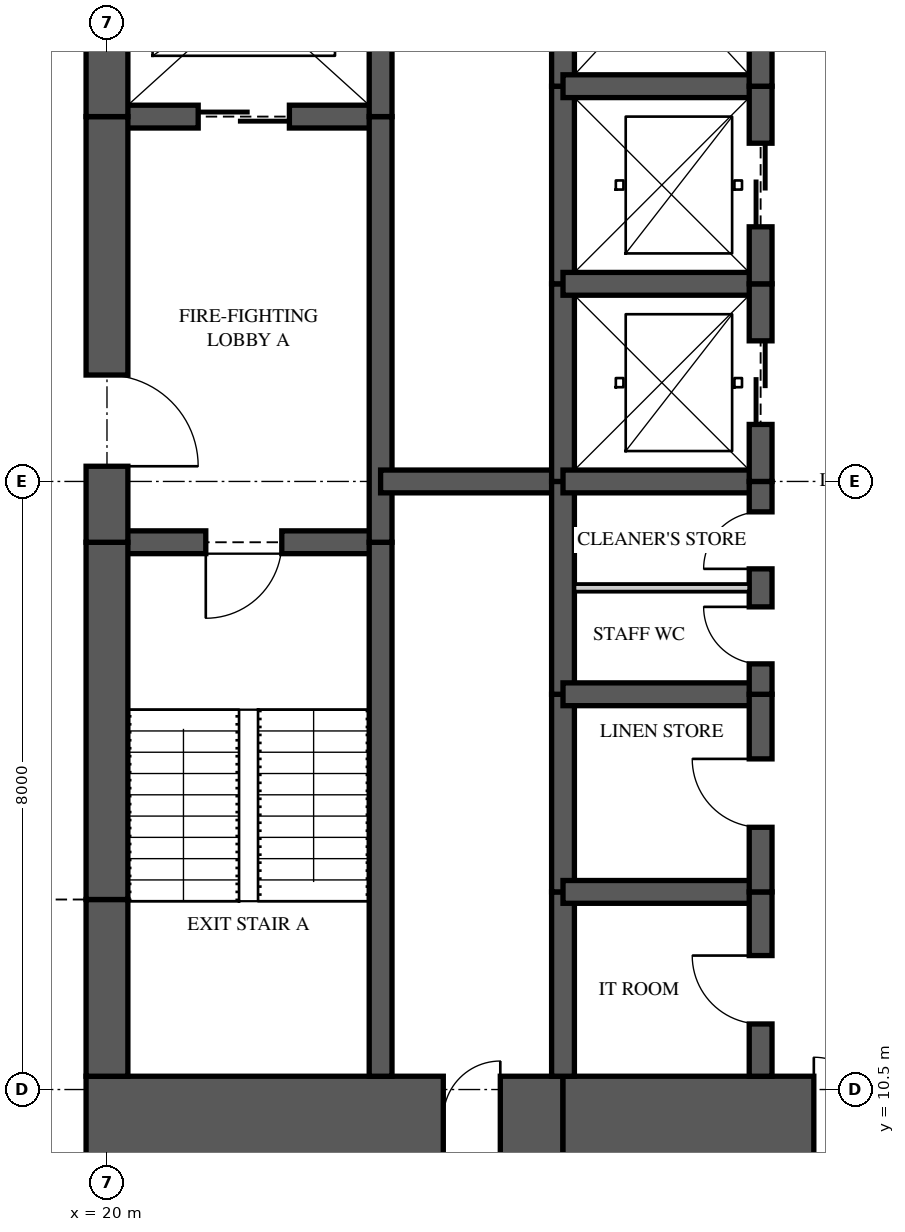
"""IFC4 building model, lengths in metres.
Left out: names, types, materials, properties, quantities, classifications, styles, units other than length and angle.
Written with IfcOpenShell. Run it as: python <this file> out.ifc"""

import sys

from ifc_helpers import new_model, si_unit, direction, frame, frame_2d, origin, place, context, subcontext, project, spatial, rectangle, extrude, element, fill, save


model = new_model("IFC4")
c1 = context("Model", 3, precision=1e-05, world=origin(), true_north=direction((0.0, 1.0)))
c2 = subcontext(c1, "Body", "Model", "MODEL_VIEW")
j1 = project(units=[si_unit("LENGTHUNIT", "METRE"), si_unit("PLANEANGLEUNIT", "RADIAN")], contexts=[c1])
p1 = place(None, origin())
s1 = spatial("IfcSite", under=j1, at=p1, CompositionType="ELEMENT")
p2 = place(p1, origin())
s2 = spatial("IfcBuilding", under=s1, at=p2, CompositionType="ELEMENT")
p3 = place(p2, frame((0.0, 0.0, 228.45)))
s3 = spatial("IfcBuildingStorey", under=s2, at=p3, CompositionType="ELEMENT", Elevation=228.45)
p4 = place(p3, frame((19.725, 10.125, 0.0), z_axis=(0.0, 0.0, 1.0), x_axis=(1.0, 0.0, 0.0)))
e1 = element("IfcWall", 1, at=p4, inside=s3, PredefinedType="SHEAR", context=c2, shape_type="SweptSolid", body=[
    extrude(rectangle(XDim=6.275, YDim=1.1, at=frame_2d((3.137, 0.0))), origin(), (0.0, 0.0, 1.0), 3.5),
])
p5 = place(p4, frame((4.7, 0.0, 0.0)))
e2 = element("IfcOpeningElement", 2, at=p5, cuts=e1, PredefinedType="OPENING", context=c2, shape_type="SweptSolid", body=[
    extrude(rectangle(XDim=0.75, YDim=2.1, at=frame_2d((0.375, 1.05))), frame((0.0, 0.56, 0.0), z_axis=(0.0, -1.0, 0.0), x_axis=(1.0, 0.0, 0.0)), (0.0, 0.0, 1.0), 1.12),
])
p6 = place(p3, frame((26.0, 10.125, 0.0), z_axis=(0.0, 0.0, 1.0), x_axis=(1.0, 0.0, 0.0)))
e3 = element("IfcWall", 3, at=p6, inside=s3, PredefinedType="SHEAR", context=c2, shape_type="SweptSolid", body=[
    extrude(rectangle(XDim=5.6, YDim=1.1, at=frame_2d((2.8, 0.0))), origin(), (0.0, 0.0, 1.0), 3.5),
])
p7 = place(p6, frame((3.3, 0.0, 0.0)))
e4 = element("IfcOpeningElement", 4, at=p7, cuts=e3, PredefinedType="OPENING", context=c2, shape_type="SweptSolid", body=[
    extrude(rectangle(XDim=1.6, YDim=2.1, at=frame_2d((0.8, 1.05))), frame((0.0, 0.56, 0.0), z_axis=(0.0, -1.0, 0.0), x_axis=(1.0, 0.0, 0.0)), (0.0, 0.0, 1.0), 1.12),
])
p8 = place(p3, frame((20.0, 26.325, 0.0), z_axis=(0.0, 0.0, 1.0), x_axis=(0.0, -1.0, 0.0)))
e5 = element("IfcWall", 5, at=p8, inside=s3, PredefinedType="SHEAR", context=c2, shape_type="SweptSolid", body=[
    extrude(rectangle(XDim=3.025, YDim=0.55, at=frame_2d((1.512, 0.0))), origin(), (0.0, 0.0, 1.0), 3.5),
])
p9 = place(p3, frame((20.0, 23.3, 0.0), z_axis=(0.0, 0.0, 1.0), x_axis=(0.0, -1.0, 0.0)))
e6 = element("IfcWall", 6, at=p9, inside=s3, PredefinedType="SHEAR", context=c2, shape_type="SweptSolid", body=[
    extrude(rectangle(XDim=5.6, YDim=0.55, at=frame_2d((2.8, 0.0))), origin(), (0.0, 0.0, 1.0), 3.5),
])
p10 = place(p9, frame((3.4, 0.0, 0.0)))
e7 = element("IfcOpeningElement", 7, at=p10, cuts=e6, PredefinedType="OPENING", context=c2, shape_type="SweptSolid", body=[
    extrude(rectangle(XDim=1.2, YDim=2.2, at=frame_2d((0.6, 1.1))), frame((0.0, 0.285, 0.0), z_axis=(0.0, -1.0, 0.0), x_axis=(1.0, 0.0, 0.0)), (0.0, 0.0, 1.0), 0.57),
])
p11 = place(p3, frame((20.0, 17.7, 0.0), z_axis=(0.0, 0.0, 1.0), x_axis=(0.0, -1.0, 0.0)))
e8 = element("IfcWall", 8, at=p11, inside=s3, PredefinedType="SHEAR", context=c2, shape_type="SweptSolid", body=[
    extrude(rectangle(XDim=4.7, YDim=0.55, at=frame_2d((2.35, 0.0))), origin(), (0.0, 0.0, 1.0), 3.5),
])
p12 = place(p3, frame((20.0, 13.0, 0.0), z_axis=(0.0, 0.0, 1.0), x_axis=(0.0, -1.0, 0.0)))
e9 = element("IfcWall", 9, at=p12, inside=s3, PredefinedType="SHEAR", context=c2, shape_type="SweptSolid", body=[
    extrude(rectangle(XDim=2.325, YDim=0.55, at=frame_2d((1.163, 0.0))), origin(), (0.0, 0.0, 1.0), 3.5),
])
p13 = place(p3, frame((23.6, 10.675, 0.0), z_axis=(0.0, 0.0, 1.0), x_axis=(0.0, 1.0, 0.0)))
e10 = element("IfcWall", 10, at=p13, inside=s3, PredefinedType="SHEAR", context=c2, shape_type="SweptSolid", body=[
    extrude(rectangle(XDim=7.025, YDim=0.3, at=frame_2d((3.512, 0.0))), origin(), (0.0, 0.0, 1.0), 3.5),
])
p14 = place(p3, frame((23.6, 17.7, 0.0), z_axis=(0.0, 0.0, 1.0), x_axis=(0.0, 1.0, 0.0)))
e11 = element("IfcWall", 11, at=p14, inside=s3, PredefinedType="SHEAR", context=c2, shape_type="SweptSolid", body=[
    extrude(rectangle(XDim=5.6, YDim=0.3, at=frame_2d((2.8, 0.0))), origin(), (0.0, 0.0, 1.0), 3.5),
])
p15 = place(p3, frame((23.6, 23.3, 0.0), z_axis=(0.0, 0.0, 1.0), x_axis=(0.0, 1.0, 0.0)))
e12 = element("IfcWall", 12, at=p15, inside=s3, PredefinedType="SHEAR", context=c2, shape_type="SweptSolid", body=[
    extrude(rectangle(XDim=3.025, YDim=0.3, at=frame_2d((1.512, 0.0))), origin(), (0.0, 0.0, 1.0), 3.5),
])
p16 = place(p3, frame((26.0, 10.675, 0.0), z_axis=(0.0, 0.0, 1.0), x_axis=(0.0, 1.0, 0.0)))
e13 = element("IfcWall", 13, at=p16, inside=s3, PredefinedType="SHEAR", context=c2, shape_type="SweptSolid", body=[
    extrude(rectangle(XDim=2.425, YDim=0.3, at=frame_2d((1.212, 0.0))), origin(), (0.0, 0.0, 1.0), 3.5),
])
p17 = place(p3, frame((26.0, 13.1, 0.0), z_axis=(0.0, 0.0, 1.0), x_axis=(0.0, 1.0, 0.0)))
e14 = element("IfcWall", 14, at=p17, inside=s3, PredefinedType="SHEAR", context=c2, shape_type="SweptSolid", body=[
    extrude(rectangle(XDim=2.6, YDim=0.3, at=frame_2d((1.3, 0.0))), origin(), (0.0, 0.0, 1.0), 3.5),
])
p18 = place(p3, frame((26.0, 15.7, 0.0), z_axis=(0.0, 0.0, 1.0), x_axis=(0.0, 1.0, 0.0)))
e15 = element("IfcWall", 15, at=p18, inside=s3, PredefinedType="SHEAR", context=c2, shape_type="SweptSolid", body=[
    extrude(rectangle(XDim=2.8, YDim=0.3, at=frame_2d((1.4, 0.0))), origin(), (0.0, 0.0, 1.0), 3.5),
])
p19 = place(p3, frame((26.0, 18.5, 0.0), z_axis=(0.0, 0.0, 1.0), x_axis=(0.0, 1.0, 0.0)))
e16 = element("IfcWall", 16, at=p19, inside=s3, PredefinedType="SHEAR", context=c2, shape_type="SweptSolid", body=[
    extrude(rectangle(XDim=2.6, YDim=0.3, at=frame_2d((1.3, 0.0))), origin(), (0.0, 0.0, 1.0), 3.5),
])
p20 = place(p3, frame((26.0, 21.1, 0.0), z_axis=(0.0, 0.0, 1.0), x_axis=(0.0, 1.0, 0.0)))
e17 = element("IfcWall", 17, at=p20, inside=s3, PredefinedType="SHEAR", context=c2, shape_type="SweptSolid", body=[
    extrude(rectangle(XDim=2.6, YDim=0.3, at=frame_2d((1.3, 0.0))), origin(), (0.0, 0.0, 1.0), 3.5),
])
p21 = place(p3, frame((26.0, 23.7, 0.0), z_axis=(0.0, 0.0, 1.0), x_axis=(0.0, 1.0, 0.0)))
e18 = element("IfcWall", 18, at=p21, inside=s3, PredefinedType="SHEAR", context=c2, shape_type="SweptSolid", body=[
    extrude(rectangle(XDim=2.625, YDim=0.3, at=frame_2d((1.312, 0.0))), origin(), (0.0, 0.0, 1.0), 3.5),
])
p22 = place(p3, frame((28.6, 10.675, 0.0), z_axis=(0.0, 0.0, 1.0), x_axis=(0.0, 1.0, 0.0)))
e19 = element("IfcWall", 19, at=p22, inside=s3, PredefinedType="SHEAR", context=c2, shape_type="SweptSolid", body=[
    extrude(rectangle(XDim=2.425, YDim=0.3, at=frame_2d((1.212, 0.0))), origin(), (0.0, 0.0, 1.0), 3.5),
])
p23 = place(p22, frame((0.688, 0.0, 0.0)))
e20 = element("IfcOpeningElement", 20, at=p23, cuts=e19, PredefinedType="OPENING", context=c2, shape_type="SweptSolid", body=[
    extrude(rectangle(XDim=0.9, YDim=2.1, at=frame_2d((0.45, 1.05))), frame((0.0, 0.16, 0.0), z_axis=(0.0, -1.0, 0.0), x_axis=(1.0, 0.0, 0.0)), (0.0, 0.0, 1.0), 0.32),
])
p24 = place(p3, frame((28.6, 13.1, 0.0), z_axis=(0.0, 0.0, 1.0), x_axis=(0.0, 1.0, 0.0)))
e21 = element("IfcWall", 21, at=p24, inside=s3, PredefinedType="SHEAR", context=c2, shape_type="SweptSolid", body=[
    extrude(rectangle(XDim=2.6, YDim=0.3, at=frame_2d((1.3, 0.0))), origin(), (0.0, 0.0, 1.0), 3.5),
])
p25 = place(p24, frame((0.85, 0.0, 0.0)))
e22 = element("IfcOpeningElement", 22, at=p25, cuts=e21, PredefinedType="OPENING", context=c2, shape_type="SweptSolid", body=[
    extrude(rectangle(XDim=0.9, YDim=2.1, at=frame_2d((0.45, 1.05))), frame((0.0, 0.16, 0.0), z_axis=(0.0, -1.0, 0.0), x_axis=(1.0, 0.0, 0.0)), (0.0, 0.0, 1.0), 0.32),
])
p26 = place(p3, frame((28.6, 15.7, 0.0), z_axis=(0.0, 0.0, 1.0), x_axis=(0.0, 1.0, 0.0)))
e23 = element("IfcWall", 23, at=p26, inside=s3, PredefinedType="SHEAR", context=c2, shape_type="SweptSolid", body=[
    extrude(rectangle(XDim=2.8, YDim=0.3, at=frame_2d((1.4, 0.0))), origin(), (0.0, 0.0, 1.0), 3.5),
])
p27 = place(p26, frame((0.4, 0.0, 0.0)))
e24 = element("IfcOpeningElement", 24, at=p27, cuts=e23, PredefinedType="OPENING", context=c2, shape_type="SweptSolid", body=[
    extrude(rectangle(XDim=0.75, YDim=2.1, at=frame_2d((0.375, 1.05))), frame((0.0, 0.16, 0.0), z_axis=(0.0, -1.0, 0.0), x_axis=(1.0, 0.0, 0.0)), (0.0, 0.0, 1.0), 0.32),
])
p28 = place(p26, frame((1.65, 0.0, 0.0)))
e25 = element("IfcOpeningElement", 25, at=p28, cuts=e23, PredefinedType="OPENING", context=c2, shape_type="SweptSolid", body=[
    extrude(rectangle(XDim=0.75, YDim=2.1, at=frame_2d((0.375, 1.05))), frame((0.0, 0.16, 0.0), z_axis=(0.0, -1.0, 0.0), x_axis=(1.0, 0.0, 0.0)), (0.0, 0.0, 1.0), 0.32),
])
p29 = place(p3, frame((28.6, 18.5, 0.0), z_axis=(0.0, 0.0, 1.0), x_axis=(0.0, 1.0, 0.0)))
e26 = element("IfcWall", 26, at=p29, inside=s3, PredefinedType="SHEAR", context=c2, shape_type="SweptSolid", body=[
    extrude(rectangle(XDim=2.6, YDim=0.3, at=frame_2d((1.3, 0.0))), origin(), (0.0, 0.0, 1.0), 3.5),
])
p30 = place(p29, frame((0.75, 0.0, 0.0)))
e27 = element("IfcOpeningElement", 27, at=p30, cuts=e26, PredefinedType="OPENING", context=c2, shape_type="SweptSolid", body=[
    extrude(rectangle(XDim=1.1, YDim=2.1, at=frame_2d((0.55, 1.05))), frame((0.0, 0.16, 0.0), z_axis=(0.0, -1.0, 0.0), x_axis=(1.0, 0.0, 0.0)), (0.0, 0.0, 1.0), 0.32),
])
p31 = place(p3, frame((28.6, 21.1, 0.0), z_axis=(0.0, 0.0, 1.0), x_axis=(0.0, 1.0, 0.0)))
e28 = element("IfcWall", 28, at=p31, inside=s3, PredefinedType="SHEAR", context=c2, shape_type="SweptSolid", body=[
    extrude(rectangle(XDim=2.6, YDim=0.3, at=frame_2d((1.3, 0.0))), origin(), (0.0, 0.0, 1.0), 3.5),
])
p32 = place(p31, frame((0.75, 0.0, 0.0)))
e29 = element("IfcOpeningElement", 29, at=p32, cuts=e28, PredefinedType="OPENING", context=c2, shape_type="SweptSolid", body=[
    extrude(rectangle(XDim=1.1, YDim=2.1, at=frame_2d((0.55, 1.05))), frame((0.0, 0.16, 0.0), z_axis=(0.0, -1.0, 0.0), x_axis=(1.0, 0.0, 0.0)), (0.0, 0.0, 1.0), 0.32),
])
p33 = place(p3, frame((28.6, 23.7, 0.0), z_axis=(0.0, 0.0, 1.0), x_axis=(0.0, 1.0, 0.0)))
e30 = element("IfcWall", 30, at=p33, inside=s3, PredefinedType="SHEAR", context=c2, shape_type="SweptSolid", body=[
    extrude(rectangle(XDim=2.625, YDim=0.3, at=frame_2d((1.312, 0.0))), origin(), (0.0, 0.0, 1.0), 3.5),
])
p34 = place(p33, frame((0.85, 0.0, 0.0)))
e31 = element("IfcOpeningElement", 31, at=p34, cuts=e30, PredefinedType="OPENING", context=c2, shape_type="SweptSolid", body=[
    extrude(rectangle(XDim=1.1, YDim=2.1, at=frame_2d((0.55, 1.05))), frame((0.0, 0.16, 0.0), z_axis=(0.0, -1.0, 0.0), x_axis=(1.0, 0.0, 0.0)), (0.0, 0.0, 1.0), 0.32),
])
p35 = place(p3, frame((20.0, 17.7, 0.0), z_axis=(0.0, 0.0, 1.0), x_axis=(1.0, 0.0, 0.0)))
e32 = element("IfcWall", 32, at=p35, inside=s3, PredefinedType="SHEAR", context=c2, shape_type="SweptSolid", body=[
    extrude(rectangle(XDim=3.6, YDim=0.3, at=frame_2d((1.8, 0.0))), origin(), (0.0, 0.0, 1.0), 3.5),
])
p36 = place(p35, frame((1.3, 0.0, 0.0)))
e33 = element("IfcOpeningElement", 33, at=p36, cuts=e32, PredefinedType="OPENING", context=c2, shape_type="SweptSolid", body=[
    extrude(rectangle(XDim=1.0, YDim=2.1, at=frame_2d((0.5, 1.05))), frame((0.0, 0.16, 0.0), z_axis=(0.0, -1.0, 0.0), x_axis=(1.0, 0.0, 0.0)), (0.0, 0.0, 1.0), 0.32),
])
p37 = place(p3, frame((20.0, 23.3, 0.0), z_axis=(0.0, 0.0, 1.0), x_axis=(1.0, 0.0, 0.0)))
e34 = element("IfcWall", 34, at=p37, inside=s3, PredefinedType="SHEAR", context=c2, shape_type="SweptSolid", body=[
    extrude(rectangle(XDim=3.6, YDim=0.3, at=frame_2d((1.8, 0.0))), origin(), (0.0, 0.0, 1.0), 3.5),
])
p38 = place(p37, frame((1.2, 0.0, 0.0)))
e35 = element("IfcOpeningElement", 35, at=p38, cuts=e34, PredefinedType="OPENING", context=c2, shape_type="SweptSolid", body=[
    extrude(rectangle(XDim=1.2, YDim=2.1, at=frame_2d((0.6, 1.05))), frame((0.0, 0.16, 0.0), z_axis=(0.0, -1.0, 0.0), x_axis=(1.0, 0.0, 0.0)), (0.0, 0.0, 1.0), 0.32),
])
p39 = place(p3, frame((23.6, 18.5, 0.0), z_axis=(0.0, 0.0, 1.0), x_axis=(1.0, 0.0, 0.0)))
e36 = element("IfcWall", 36, at=p39, inside=s3, PredefinedType="SHEAR", context=c2, shape_type="SweptSolid", body=[
    extrude(rectangle(XDim=2.4, YDim=0.3, at=frame_2d((1.2, 0.0))), origin(), (0.0, 0.0, 1.0), 3.5),
])
for number, where, z_axis, x_axis in (
    (37, (26.0, 13.1, 0.0), (0.0, 0.0, 1.0), (1.0, 0.0, 0.0)),
    (38, (26.0, 15.7, 0.0), (0.0, 0.0, 1.0), (1.0, 0.0, 0.0)),
    (39, (26.0, 18.5, 0.0), (0.0, 0.0, 1.0), (1.0, 0.0, 0.0)),
    (40, (26.0, 21.1, 0.0), (0.0, 0.0, 1.0), (1.0, 0.0, 0.0)),
    (41, (26.0, 23.7, 0.0), (0.0, 0.0, 1.0), (1.0, 0.0, 0.0)),
):
    element("IfcWall", number, at=place(p3, frame(where, z_axis=z_axis, x_axis=x_axis)), inside=s3, PredefinedType="SHEAR", context=c2, shape_type="SweptSolid", body=[
        extrude(rectangle(XDim=2.6, YDim=0.3, at=frame_2d((1.3, 0.0))), origin(), (0.0, 0.0, 1.0), 3.5),
    ])
p40 = place(p3, frame((26.15, 17.1, 0.0), z_axis=(0.0, 0.0, 1.0), x_axis=(1.0, 0.0, 0.0)))
e42 = element("IfcWall", 42, at=p40, inside=s3, PredefinedType="PARTITIONING", context=c2, shape_type="SweptSolid", body=[
    extrude(rectangle(XDim=2.3, YDim=0.1, at=frame_2d((1.15, 0.0))), origin(), (0.0, 0.0, 1.0), 3.26),
])
p41 = place(p36, frame((1.0, 0.0, 0.0), z_axis=(0.0, 0.0, 1.0), x_axis=(-1.0, 0.0, 0.0)))
e43 = element("IfcDoor", 43, at=p41, inside=s3, OperationType="SINGLE_SWING_RIGHT", PredefinedType="DOOR", context=c2, shape_type="SweptSolid", body=[
    extrude(rectangle(XDim=1.0, YDim=2.1, at=frame_2d((0.5, 1.05))), frame((0.0, 0.025, 0.0), z_axis=(0.0, -1.0, 0.0), x_axis=(1.0, 0.0, 0.0)), (0.0, 0.0, 1.0), 0.05),
])
fill(e33, e43)
p42 = place(p10, origin())
e44 = element("IfcDoor", 44, at=p42, inside=s3, OperationType="SINGLE_SWING_RIGHT", PredefinedType="DOOR", context=c2, shape_type="SweptSolid", body=[
    extrude(rectangle(XDim=1.2, YDim=2.2, at=frame_2d((0.6, 1.1))), frame((0.0, 0.025, 0.0), z_axis=(0.0, -1.0, 0.0), x_axis=(1.0, 0.0, 0.0)), (0.0, 0.0, 1.0), 0.05),
])
fill(e7, e44)
p43 = place(p38, origin())
e45 = element("IfcDoor", 45, at=p43, inside=s3, OperationType="SLIDING_TO_LEFT", PredefinedType="DOOR", context=c2, shape_type="SweptSolid", body=[
    extrude(rectangle(XDim=1.2, YDim=2.1, at=frame_2d((0.6, 1.05))), frame((0.0, 0.025, 0.0), z_axis=(0.0, -1.0, 0.0), x_axis=(1.0, 0.0, 0.0)), (0.0, 0.0, 1.0), 0.05),
])
fill(e35, e45)
p44 = place(p30, origin())
e46 = element("IfcDoor", 46, at=p44, inside=s3, OperationType="SLIDING_TO_LEFT", PredefinedType="DOOR", context=c2, shape_type="SweptSolid", body=[
    extrude(rectangle(XDim=1.1, YDim=2.1, at=frame_2d((0.55, 1.05))), frame((0.0, 0.025, 0.0), z_axis=(0.0, -1.0, 0.0), x_axis=(1.0, 0.0, 0.0)), (0.0, 0.0, 1.0), 0.05),
])
fill(e27, e46)
p45 = place(p32, origin())
e47 = element("IfcDoor", 47, at=p45, inside=s3, OperationType="SLIDING_TO_LEFT", PredefinedType="DOOR", context=c2, shape_type="SweptSolid", body=[
    extrude(rectangle(XDim=1.1, YDim=2.1, at=frame_2d((0.55, 1.05))), frame((0.0, 0.025, 0.0), z_axis=(0.0, -1.0, 0.0), x_axis=(1.0, 0.0, 0.0)), (0.0, 0.0, 1.0), 0.05),
])
fill(e29, e47)
p46 = place(p23, origin())
e48 = element("IfcDoor", 48, at=p46, inside=s3, OperationType="SINGLE_SWING_RIGHT", PredefinedType="DOOR", context=c2, shape_type="SweptSolid", body=[
    extrude(rectangle(XDim=0.9, YDim=2.1, at=frame_2d((0.45, 1.05))), frame((0.0, 0.025, 0.0), z_axis=(0.0, -1.0, 0.0), x_axis=(1.0, 0.0, 0.0)), (0.0, 0.0, 1.0), 0.05),
])
fill(e20, e48)
p47 = place(p25, origin())
e49 = element("IfcDoor", 49, at=p47, inside=s3, OperationType="SINGLE_SWING_RIGHT", PredefinedType="DOOR", context=c2, shape_type="SweptSolid", body=[
    extrude(rectangle(XDim=0.9, YDim=2.1, at=frame_2d((0.45, 1.05))), frame((0.0, 0.025, 0.0), z_axis=(0.0, -1.0, 0.0), x_axis=(1.0, 0.0, 0.0)), (0.0, 0.0, 1.0), 0.05),
])
fill(e22, e49)
p48 = place(p27, origin())
e50 = element("IfcDoor", 50, at=p48, inside=s3, OperationType="SINGLE_SWING_RIGHT", PredefinedType="DOOR", context=c2, shape_type="SweptSolid", body=[
    extrude(rectangle(XDim=0.75, YDim=2.1, at=frame_2d((0.375, 1.05))), frame((0.0, 0.025, 0.0), z_axis=(0.0, -1.0, 0.0), x_axis=(1.0, 0.0, 0.0)), (0.0, 0.0, 1.0), 0.05),
])
fill(e24, e50)
p49 = place(p28, origin())
e51 = element("IfcDoor", 51, at=p49, inside=s3, OperationType="SINGLE_SWING_LEFT", PredefinedType="DOOR", context=c2, shape_type="SweptSolid", body=[
    extrude(rectangle(XDim=0.75, YDim=2.1, at=frame_2d((0.375, 1.05))), frame((0.0, 0.025, 0.0), z_axis=(0.0, -1.0, 0.0), x_axis=(1.0, 0.0, 0.0)), (0.0, 0.0, 1.0), 0.05),
])
fill(e25, e51)
p50 = place(p7, origin())
e52 = element("IfcDoor", 52, at=p50, inside=s3, OperationType="DOUBLE_DOOR_SINGLE_SWING", PredefinedType="DOOR", context=c2, shape_type="SweptSolid", body=[
    extrude(rectangle(XDim=1.6, YDim=2.1, at=frame_2d((0.8, 1.05))), frame((0.0, 0.025, 0.0), z_axis=(0.0, -1.0, 0.0), x_axis=(1.0, 0.0, 0.0)), (0.0, 0.0, 1.0), 0.05),
])
fill(e4, e52)
p51 = place(p5, origin())
e53 = element("IfcDoor", 53, at=p51, inside=s3, OperationType="SINGLE_SWING_RIGHT", PredefinedType="DOOR", context=c2, shape_type="SweptSolid", body=[
    extrude(rectangle(XDim=0.75, YDim=2.1, at=frame_2d((0.375, 1.05))), frame((0.0, 0.025, 0.0), z_axis=(0.0, -1.0, 0.0), x_axis=(1.0, 0.0, 0.0)), (0.0, 0.0, 1.0), 0.05),
])
fill(e2, e53)
save(model, sys.argv[1])
